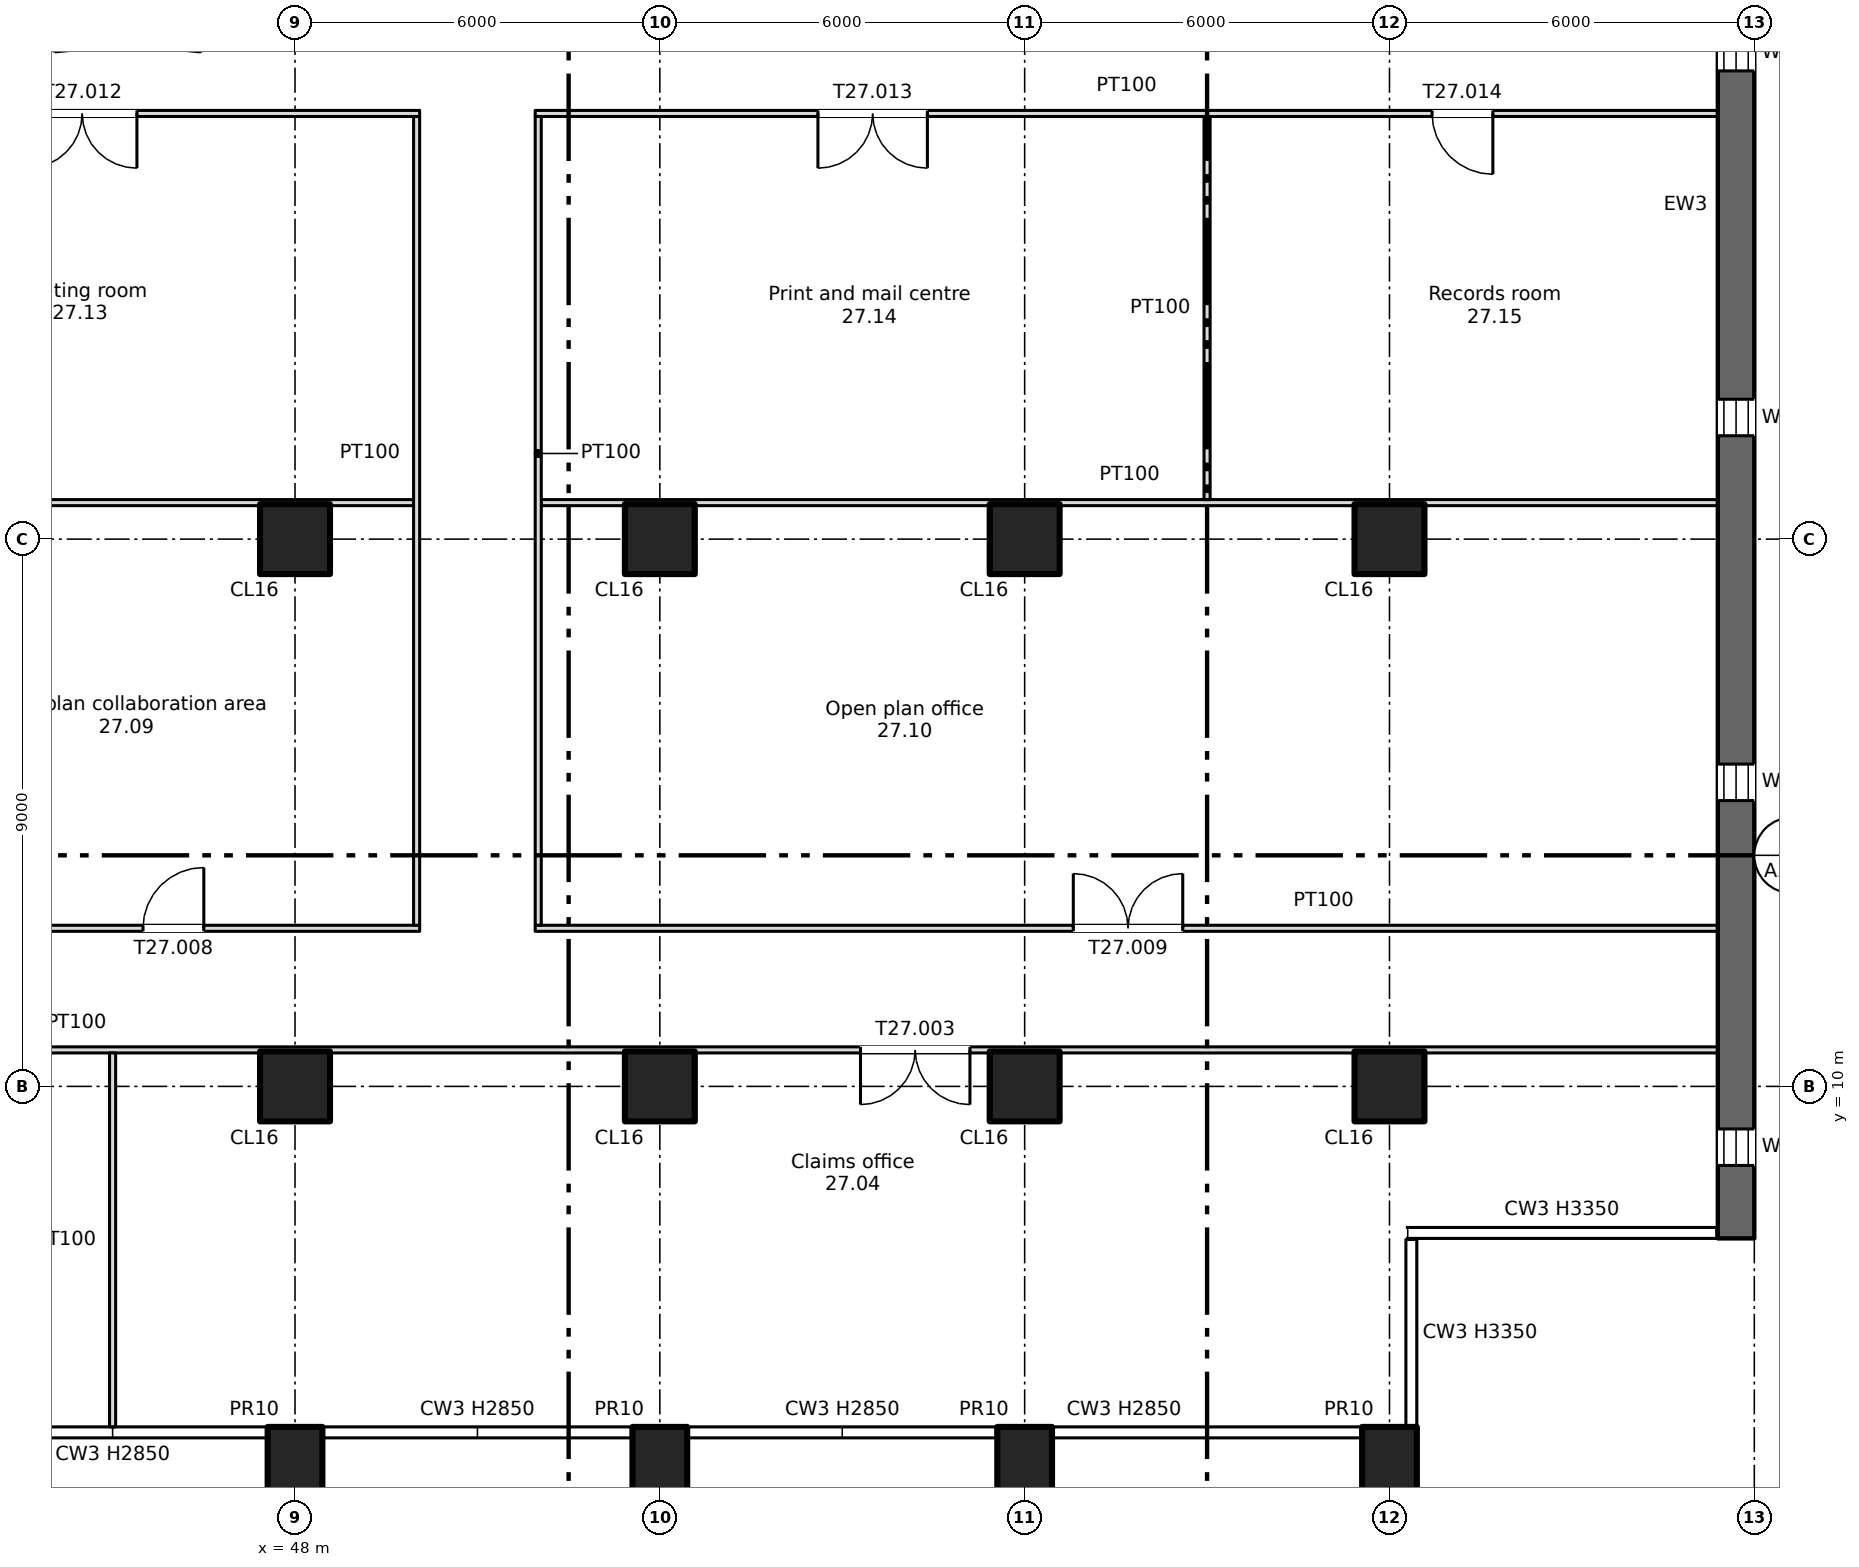
"""IFC4 building model, lengths in metres.
Left out: names, types, materials, properties, quantities, classifications, styles, units other than length and angle.
Written with IfcOpenShell. Run it as: python <this file> out.ifc"""

import sys

from ifc_helpers import new_model, si_unit, direction, frame, frame_2d, origin, origin_2d, place, context, subcontext, project, spatial, rectangle, extrude, element, fill, save


model = new_model("IFC4")
c1 = context("Model", 3, precision=1e-05, world=origin(), true_north=direction((0.0, 1.0)))
c2 = subcontext(c1, "Body", "Model", "MODEL_VIEW")
j1 = project(units=[si_unit("LENGTHUNIT", "METRE"), si_unit("PLANEANGLEUNIT", "RADIAN")], contexts=[c1])
p1 = place(None, origin())
s1 = spatial("IfcSite", under=j1, at=p1, CompositionType="ELEMENT")
p2 = place(p1, origin())
s2 = spatial("IfcBuilding", under=s1, at=p2, CompositionType="ELEMENT")
p3 = place(p2, frame((0.0, 0.0, 185.5)))
s3 = spatial("IfcBuildingStorey", under=s2, at=p3, CompositionType="ELEMENT", Elevation=185.5)
for number, where, z_axis, x_axis in (
    (1, (48.0, 3.7, -0.4), (0.0, 0.0, 1.0), (1.0, 0.0, 0.0)),
    (2, (54.0, 3.7, -0.4), (0.0, 0.0, 1.0), (1.0, 0.0, 0.0)),
    (3, (60.0, 3.7, -0.4), (0.0, 0.0, 1.0), (1.0, 0.0, 0.0)),
    (4, (66.0, 3.7, -0.4), (0.0, 0.0, 1.0), (1.0, 0.0, 0.0)),
):
    element("IfcColumn", number, at=place(p3, frame(where, z_axis=z_axis, x_axis=x_axis)), inside=s3, PredefinedType="COLUMN", context=c2, shape_type="SweptSolid", body=[
        extrude(rectangle(XDim=0.9, YDim=1.4, at=origin_2d()), origin(), (0.0, 0.0, 1.0), 3.75),
    ])
for number, where, z_axis, x_axis in (
    (5, (48.0, 10.0, 0.0), (0.0, 0.0, 1.0), (1.0, 0.0, 0.0)),
    (6, (48.0, 19.0, 0.0), (0.0, 0.0, 1.0), (1.0, 0.0, 0.0)),
    (7, (54.0, 10.0, 0.0), (0.0, 0.0, 1.0), (1.0, 0.0, 0.0)),
    (8, (54.0, 19.0, 0.0), (0.0, 0.0, 1.0), (1.0, 0.0, 0.0)),
    (9, (60.0, 10.0, 0.0), (0.0, 0.0, 1.0), (1.0, 0.0, 0.0)),
    (10, (60.0, 19.0, 0.0), (0.0, 0.0, 1.0), (1.0, 0.0, 0.0)),
    (11, (66.0, 10.0, 0.0), (0.0, 0.0, 1.0), (1.0, 0.0, 0.0)),
    (12, (66.0, 19.0, 0.0), (0.0, 0.0, 1.0), (1.0, 0.0, 0.0)),
):
    element("IfcColumn", number, at=place(p3, frame(where, z_axis=z_axis, x_axis=x_axis)), inside=s3, PredefinedType="COLUMN", context=c2, shape_type="SweptSolid", body=[
        extrude(rectangle(XDim=1.15, YDim=1.15, at=origin_2d()), origin(), (0.0, 0.0, 1.0), 3.35),
    ])
p4 = place(p3, frame((71.7, 7.5, 0.0), z_axis=(0.0, 0.0, 1.0), x_axis=(0.0, 1.0, 0.0)))
e13 = element("IfcWall", 13, at=p4, inside=s3, PredefinedType="SHEAR", context=c2, shape_type="SweptSolid", body=[
    extrude(rectangle(XDim=34.0, YDim=0.6, at=frame_2d((17.0, 0.0))), origin(), (0.0, 0.0, 1.0), 3.35),
])
p5 = place(p4, frame((1.2, 0.0, 0.6)))
e14 = element("IfcOpeningElement", 14, at=p5, cuts=e13, PredefinedType="OPENING", context=c2, shape_type="SweptSolid", body=[
    extrude(rectangle(XDim=0.6, YDim=2.4, at=frame_2d((0.3, 1.2))), frame((0.0, 0.31, 0.0), z_axis=(0.0, -1.0, 0.0), x_axis=(1.0, 0.0, 0.0)), (0.0, 0.0, 1.0), 0.62),
])
p6 = place(p4, frame((7.2, 0.0, 0.6)))
e15 = element("IfcOpeningElement", 15, at=p6, cuts=e13, PredefinedType="OPENING", context=c2, shape_type="SweptSolid", body=[
    extrude(rectangle(XDim=0.6, YDim=2.4, at=frame_2d((0.3, 1.2))), frame((0.0, 0.31, 0.0), z_axis=(0.0, -1.0, 0.0), x_axis=(1.0, 0.0, 0.0)), (0.0, 0.0, 1.0), 0.62),
])
p7 = place(p4, frame((13.2, 0.0, 0.6)))
e16 = element("IfcOpeningElement", 16, at=p7, cuts=e13, PredefinedType="OPENING", context=c2, shape_type="SweptSolid", body=[
    extrude(rectangle(XDim=0.6, YDim=2.4, at=frame_2d((0.3, 1.2))), frame((0.0, 0.31, 0.0), z_axis=(0.0, -1.0, 0.0), x_axis=(1.0, 0.0, 0.0)), (0.0, 0.0, 1.0), 0.62),
])
p8 = place(p4, frame((19.2, 0.0, 0.6)))
e17 = element("IfcOpeningElement", 17, at=p8, cuts=e13, PredefinedType="OPENING", context=c2, shape_type="SweptSolid", body=[
    extrude(rectangle(XDim=0.6, YDim=2.4, at=frame_2d((0.3, 1.2))), frame((0.0, 0.31, 0.0), z_axis=(0.0, -1.0, 0.0), x_axis=(1.0, 0.0, 0.0)), (0.0, 0.0, 1.0), 0.62),
])
p9 = place(p4, frame((25.2, 0.0, 0.6)))
e18 = element("IfcOpeningElement", 18, at=p9, cuts=e13, PredefinedType="OPENING", context=c2, shape_type="SweptSolid", body=[
    extrude(rectangle(XDim=0.6, YDim=2.4, at=frame_2d((0.3, 1.2))), frame((0.0, 0.31, 0.0), z_axis=(0.0, -1.0, 0.0), x_axis=(1.0, 0.0, 0.0)), (0.0, 0.0, 1.0), 0.62),
])
p10 = place(p4, frame((31.2, 0.0, 0.6)))
e19 = element("IfcOpeningElement", 19, at=p10, cuts=e13, PredefinedType="OPENING", context=c2, shape_type="SweptSolid", body=[
    extrude(rectangle(XDim=0.6, YDim=2.4, at=frame_2d((0.3, 1.2))), frame((0.0, 0.31, 0.0), z_axis=(0.0, -1.0, 0.0), x_axis=(1.0, 0.0, 0.0)), (0.0, 0.0, 1.0), 0.62),
])
p11 = place(p3, frame((6.6, 10.6, 0.0), z_axis=(0.0, 0.0, 1.0), x_axis=(1.0, 0.0, 0.0)))
e20 = element("IfcWall", 20, at=p11, inside=s3, PredefinedType="PARTITIONING", context=c2, shape_type="SweptSolid", body=[
    extrude(rectangle(XDim=64.8, YDim=0.1, at=frame_2d((32.4, 0.0))), origin(), (0.0, 0.0, 1.0), 3.35),
])
p12 = place(p11, frame((15.0, 0.0, 0.0)))
e21 = element("IfcOpeningElement", 21, at=p12, cuts=e20, PredefinedType="OPENING", context=c2, shape_type="SweptSolid", body=[
    extrude(rectangle(XDim=1.8, YDim=2.1, at=frame_2d((0.9, 1.05))), frame((0.0, 0.06, 0.0), z_axis=(0.0, -1.0, 0.0), x_axis=(1.0, 0.0, 0.0)), (0.0, 0.0, 1.0), 0.12),
])
p13 = place(p11, frame((30.0, 0.0, 0.0)))
e22 = element("IfcOpeningElement", 22, at=p13, cuts=e20, PredefinedType="OPENING", context=c2, shape_type="SweptSolid", body=[
    extrude(rectangle(XDim=1.8, YDim=2.1, at=frame_2d((0.9, 1.05))), frame((0.0, 0.06, 0.0), z_axis=(0.0, -1.0, 0.0), x_axis=(1.0, 0.0, 0.0)), (0.0, 0.0, 1.0), 0.12),
])
p14 = place(p11, frame((50.7, 0.0, 0.0)))
e23 = element("IfcOpeningElement", 23, at=p14, cuts=e20, PredefinedType="OPENING", context=c2, shape_type="SweptSolid", body=[
    extrude(rectangle(XDim=1.8, YDim=2.1, at=frame_2d((0.9, 1.05))), frame((0.0, 0.06, 0.0), z_axis=(0.0, -1.0, 0.0), x_axis=(1.0, 0.0, 0.0)), (0.0, 0.0, 1.0), 0.12),
])
p15 = place(p11, frame((3.7, 0.0, 0.0)))
e24 = element("IfcOpeningElement", 24, at=p15, cuts=e20, PredefinedType="OPENING", context=c2, shape_type="SweptSolid", body=[
    extrude(rectangle(XDim=1.0, YDim=2.1, at=frame_2d((0.5, 1.05))), frame((0.0, 0.06, 0.0), z_axis=(0.0, -1.0, 0.0), x_axis=(1.0, 0.0, 0.0)), (0.0, 0.0, 1.0), 0.12),
])
p16 = place(p3, frame((27.95, 12.6, 0.0), z_axis=(0.0, 0.0, 1.0), x_axis=(1.0, 0.0, 0.0)))
e25 = element("IfcWall", 25, at=p16, inside=s3, PredefinedType="PARTITIONING", context=c2, shape_type="SweptSolid", body=[
    extrude(rectangle(XDim=22.1, YDim=0.1, at=frame_2d((11.05, 0.0))), origin(), (0.0, 0.0, 1.0), 3.35),
])
p17 = place(p16, frame((3.55, 0.0, 0.0)))
e26 = element("IfcOpeningElement", 26, at=p17, cuts=e25, PredefinedType="OPENING", context=c2, shape_type="SweptSolid", body=[
    extrude(rectangle(XDim=1.0, YDim=2.1, at=frame_2d((0.5, 1.05))), frame((0.0, 0.06, 0.0), z_axis=(0.0, -1.0, 0.0), x_axis=(1.0, 0.0, 0.0)), (0.0, 0.0, 1.0), 0.12),
])
p18 = place(p16, frame((10.55, 0.0, 0.0)))
e27 = element("IfcOpeningElement", 27, at=p18, cuts=e25, PredefinedType="OPENING", context=c2, shape_type="SweptSolid", body=[
    extrude(rectangle(XDim=1.0, YDim=2.1, at=frame_2d((0.5, 1.05))), frame((0.0, 0.06, 0.0), z_axis=(0.0, -1.0, 0.0), x_axis=(1.0, 0.0, 0.0)), (0.0, 0.0, 1.0), 0.12),
])
p19 = place(p16, frame((17.55, 0.0, 0.0)))
e28 = element("IfcOpeningElement", 28, at=p19, cuts=e25, PredefinedType="OPENING", context=c2, shape_type="SweptSolid", body=[
    extrude(rectangle(XDim=1.0, YDim=2.1, at=frame_2d((0.5, 1.05))), frame((0.0, 0.06, 0.0), z_axis=(0.0, -1.0, 0.0), x_axis=(1.0, 0.0, 0.0)), (0.0, 0.0, 1.0), 0.12),
])
p20 = place(p3, frame((51.95, 12.6, 0.0), z_axis=(0.0, 0.0, 1.0), x_axis=(1.0, 0.0, 0.0)))
e29 = element("IfcWall", 29, at=p20, inside=s3, PredefinedType="PARTITIONING", context=c2, shape_type="SweptSolid", body=[
    extrude(rectangle(XDim=19.45, YDim=0.1, at=frame_2d((9.725, 0.0))), origin(), (0.0, 0.0, 1.0), 3.35),
])
p21 = place(p20, frame((8.85, 0.0, 0.0)))
e30 = element("IfcOpeningElement", 30, at=p21, cuts=e29, PredefinedType="OPENING", context=c2, shape_type="SweptSolid", body=[
    extrude(rectangle(XDim=1.8, YDim=2.1, at=frame_2d((0.9, 1.05))), frame((0.0, 0.06, 0.0), z_axis=(0.0, -1.0, 0.0), x_axis=(1.0, 0.0, 0.0)), (0.0, 0.0, 1.0), 0.12),
])
p22 = place(p3, frame((28.05, 19.6, 0.0), z_axis=(0.0, 0.0, 1.0), x_axis=(1.0, 0.0, 0.0)))
e31 = element("IfcWall", 31, at=p22, inside=s3, PredefinedType="PARTITIONING", context=c2, shape_type="SweptSolid", body=[
    extrude(rectangle(XDim=21.9, YDim=0.1, at=frame_2d((10.95, 0.0))), origin(), (0.0, 0.0, 1.0), 3.35),
])
p23 = place(p3, frame((52.05, 19.6, 0.0), z_axis=(0.0, 0.0, 1.0), x_axis=(1.0, 0.0, 0.0)))
e32 = element("IfcWall", 32, at=p23, inside=s3, PredefinedType="PARTITIONING", context=c2, shape_type="SweptSolid", body=[
    extrude(rectangle(XDim=19.35, YDim=0.1, at=frame_2d((9.675, 0.0))), origin(), (0.0, 0.0, 1.0), 3.35),
])
p24 = place(p3, frame((27.95, 26.0, 0.0), z_axis=(0.0, 0.0, 1.0), x_axis=(1.0, 0.0, 0.0)))
e33 = element("IfcWall", 33, at=p24, inside=s3, PredefinedType="PARTITIONING", context=c2, shape_type="SweptSolid", body=[
    extrude(rectangle(XDim=22.1, YDim=0.1, at=frame_2d((11.05, 0.0))), origin(), (0.0, 0.0, 1.0), 3.35),
])
p25 = place(p24, frame((4.65, 0.0, 0.0)))
e34 = element("IfcOpeningElement", 34, at=p25, cuts=e33, PredefinedType="OPENING", context=c2, shape_type="SweptSolid", body=[
    extrude(rectangle(XDim=1.8, YDim=2.1, at=frame_2d((0.9, 1.05))), frame((0.0, 0.06, 0.0), z_axis=(0.0, -1.0, 0.0), x_axis=(1.0, 0.0, 0.0)), (0.0, 0.0, 1.0), 0.12),
])
p26 = place(p24, frame((15.65, 0.0, 0.0)))
e35 = element("IfcOpeningElement", 35, at=p26, cuts=e33, PredefinedType="OPENING", context=c2, shape_type="SweptSolid", body=[
    extrude(rectangle(XDim=1.8, YDim=2.1, at=frame_2d((0.9, 1.05))), frame((0.0, 0.06, 0.0), z_axis=(0.0, -1.0, 0.0), x_axis=(1.0, 0.0, 0.0)), (0.0, 0.0, 1.0), 0.12),
])
p27 = place(p3, frame((51.95, 26.0, 0.0), z_axis=(0.0, 0.0, 1.0), x_axis=(1.0, 0.0, 0.0)))
e36 = element("IfcWall", 36, at=p27, inside=s3, PredefinedType="PARTITIONING", context=c2, shape_type="SweptSolid", body=[
    extrude(rectangle(XDim=19.45, YDim=0.1, at=frame_2d((9.725, 0.0))), origin(), (0.0, 0.0, 1.0), 3.35),
])
p28 = place(p27, frame((4.65, 0.0, 0.0)))
e37 = element("IfcOpeningElement", 37, at=p28, cuts=e36, PredefinedType="OPENING", context=c2, shape_type="SweptSolid", body=[
    extrude(rectangle(XDim=1.8, YDim=2.1, at=frame_2d((0.9, 1.05))), frame((0.0, 0.06, 0.0), z_axis=(0.0, -1.0, 0.0), x_axis=(1.0, 0.0, 0.0)), (0.0, 0.0, 1.0), 0.12),
])
p29 = place(p27, frame((14.75, 0.0, 0.0)))
e38 = element("IfcOpeningElement", 38, at=p29, cuts=e36, PredefinedType="OPENING", context=c2, shape_type="SweptSolid", body=[
    extrude(rectangle(XDim=1.0, YDim=2.1, at=frame_2d((0.5, 1.05))), frame((0.0, 0.06, 0.0), z_axis=(0.0, -1.0, 0.0), x_axis=(1.0, 0.0, 0.0)), (0.0, 0.0, 1.0), 0.12),
])
p30 = place(p3, frame((45.0, 4.4, 0.0), z_axis=(0.0, 0.0, 1.0), x_axis=(0.0, 1.0, 0.0)))
e39 = element("IfcWall", 39, at=p30, inside=s3, PredefinedType="PARTITIONING", context=c2, shape_type="SweptSolid", body=[
    extrude(rectangle(XDim=6.15, YDim=0.1, at=frame_2d((3.075, 0.0))), origin(), (0.0, 0.0, 1.0), 3.35),
])
for number, where, z_axis, x_axis in (
    (40, (50.0, 12.65, 0.0), (0.0, 0.0, 1.0), (0.0, 1.0, 0.0)),
    (41, (52.0, 12.65, 0.0), (0.0, 0.0, 1.0), (0.0, 1.0, 0.0)),
):
    element("IfcWall", number, at=place(p3, frame(where, z_axis=z_axis, x_axis=x_axis)), inside=s3, PredefinedType="PARTITIONING", context=c2, shape_type="SweptSolid", body=[
        extrude(rectangle(XDim=13.3, YDim=0.1, at=frame_2d((6.65, 0.0))), origin(), (0.0, 0.0, 1.0), 3.35),
    ])
p31 = place(p3, frame((63.0, 19.65, 0.0), z_axis=(0.0, 0.0, 1.0), x_axis=(0.0, 1.0, 0.0)))
e42 = element("IfcWall", 42, at=p31, inside=s3, PredefinedType="PARTITIONING", context=c2, shape_type="SweptSolid", body=[
    extrude(rectangle(XDim=6.3, YDim=0.1, at=frame_2d((3.15, 0.0))), origin(), (0.0, 0.0, 1.0), 3.35),
])
p32 = place(p5, origin())
e43 = element("IfcWindow", 43, at=p32, inside=s3, PartitioningType="SINGLE_PANEL", PredefinedType="WINDOW", context=c2, shape_type="SweptSolid", body=[
    extrude(rectangle(XDim=0.6, YDim=2.4, at=frame_2d((0.3, 1.2))), frame((0.0, 0.03, 0.0), z_axis=(0.0, -1.0, 0.0), x_axis=(1.0, 0.0, 0.0)), (0.0, 0.0, 1.0), 0.06),
])
fill(e14, e43)
p33 = place(p6, origin())
e44 = element("IfcWindow", 44, at=p33, inside=s3, PartitioningType="SINGLE_PANEL", PredefinedType="WINDOW", context=c2, shape_type="SweptSolid", body=[
    extrude(rectangle(XDim=0.6, YDim=2.4, at=frame_2d((0.3, 1.2))), frame((0.0, 0.03, 0.0), z_axis=(0.0, -1.0, 0.0), x_axis=(1.0, 0.0, 0.0)), (0.0, 0.0, 1.0), 0.06),
])
fill(e15, e44)
p34 = place(p7, origin())
e45 = element("IfcWindow", 45, at=p34, inside=s3, PartitioningType="SINGLE_PANEL", PredefinedType="WINDOW", context=c2, shape_type="SweptSolid", body=[
    extrude(rectangle(XDim=0.6, YDim=2.4, at=frame_2d((0.3, 1.2))), frame((0.0, 0.03, 0.0), z_axis=(0.0, -1.0, 0.0), x_axis=(1.0, 0.0, 0.0)), (0.0, 0.0, 1.0), 0.06),
])
fill(e16, e45)
p35 = place(p8, origin())
e46 = element("IfcWindow", 46, at=p35, inside=s3, PartitioningType="SINGLE_PANEL", PredefinedType="WINDOW", context=c2, shape_type="SweptSolid", body=[
    extrude(rectangle(XDim=0.6, YDim=2.4, at=frame_2d((0.3, 1.2))), frame((0.0, 0.03, 0.0), z_axis=(0.0, -1.0, 0.0), x_axis=(1.0, 0.0, 0.0)), (0.0, 0.0, 1.0), 0.06),
])
fill(e17, e46)
p36 = place(p14, origin())
e47 = element("IfcDoor", 47, at=p36, inside=s3, OperationType="DOUBLE_DOOR_SINGLE_SWING", PredefinedType="DOOR", context=c2, shape_type="SweptSolid", body=[
    extrude(rectangle(XDim=1.8, YDim=2.1, at=frame_2d((0.9, 1.05))), frame((0.0, 0.025, 0.0), z_axis=(0.0, -1.0, 0.0), x_axis=(1.0, 0.0, 0.0)), (0.0, 0.0, 1.0), 0.05),
])
fill(e23, e47)
p37 = place(p19, origin())
e48 = element("IfcDoor", 48, at=p37, inside=s3, OperationType="SINGLE_SWING_RIGHT", PredefinedType="DOOR", context=c2, shape_type="SweptSolid", body=[
    extrude(rectangle(XDim=1.0, YDim=2.1, at=frame_2d((0.5, 1.05))), frame((0.0, 0.025, 0.0), z_axis=(0.0, -1.0, 0.0), x_axis=(1.0, 0.0, 0.0)), (0.0, 0.0, 1.0), 0.05),
])
fill(e28, e48)
p38 = place(p21, origin())
e49 = element("IfcDoor", 49, at=p38, inside=s3, OperationType="DOUBLE_DOOR_SINGLE_SWING", PredefinedType="DOOR", context=c2, shape_type="SweptSolid", body=[
    extrude(rectangle(XDim=1.8, YDim=2.1, at=frame_2d((0.9, 1.05))), frame((0.0, 0.025, 0.0), z_axis=(0.0, -1.0, 0.0), x_axis=(1.0, 0.0, 0.0)), (0.0, 0.0, 1.0), 0.05),
])
fill(e30, e49)
p39 = place(p26, origin())
e50 = element("IfcDoor", 50, at=p39, inside=s3, OperationType="DOUBLE_DOOR_SINGLE_SWING", PredefinedType="DOOR", context=c2, shape_type="SweptSolid", body=[
    extrude(rectangle(XDim=1.8, YDim=2.1, at=frame_2d((0.9, 1.05))), frame((0.0, 0.025, 0.0), z_axis=(0.0, -1.0, 0.0), x_axis=(1.0, 0.0, 0.0)), (0.0, 0.0, 1.0), 0.05),
])
fill(e35, e50)
p40 = place(p28, origin())
e51 = element("IfcDoor", 51, at=p40, inside=s3, OperationType="DOUBLE_DOOR_SINGLE_SWING", PredefinedType="DOOR", context=c2, shape_type="SweptSolid", body=[
    extrude(rectangle(XDim=1.8, YDim=2.1, at=frame_2d((0.9, 1.05))), frame((0.0, 0.025, 0.0), z_axis=(0.0, -1.0, 0.0), x_axis=(1.0, 0.0, 0.0)), (0.0, 0.0, 1.0), 0.05),
])
fill(e37, e51)
p41 = place(p29, origin())
e52 = element("IfcDoor", 52, at=p41, inside=s3, OperationType="SINGLE_SWING_RIGHT", PredefinedType="DOOR", context=c2, shape_type="SweptSolid", body=[
    extrude(rectangle(XDim=1.0, YDim=2.1, at=frame_2d((0.5, 1.05))), frame((0.0, 0.025, 0.0), z_axis=(0.0, -1.0, 0.0), x_axis=(1.0, 0.0, 0.0)), (0.0, 0.0, 1.0), 0.05),
])
fill(e38, e52)
save(model, sys.argv[1])
